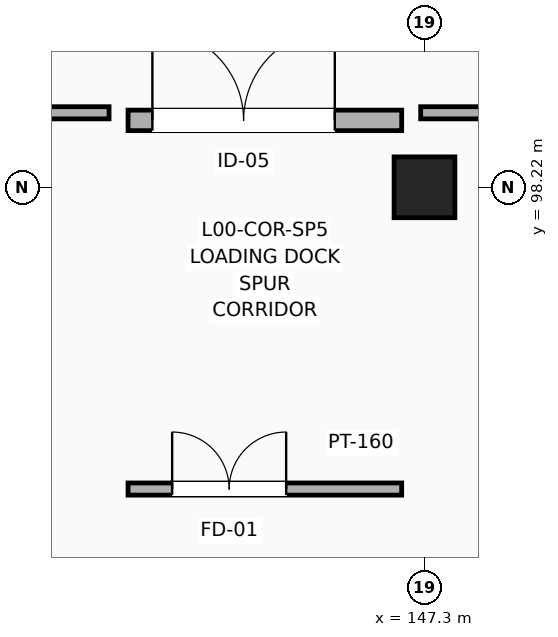
"""IFC4 building model, lengths in metres.
Left out: names, types, materials, properties, quantities, classifications, styles, units other than length and angle.
Written with IfcOpenShell. Run it as: python <this file> out.ifc"""

import sys

from ifc_helpers import new_model, si_unit, direction, frame, frame_2d, origin, origin_2d, place, context, subcontext, project, spatial, rectangle, extrude, element, fill, save


model = new_model("IFC4")
c1 = context("Model", 3, precision=1e-05, world=origin(), true_north=direction((0.0, 1.0)))
c2 = subcontext(c1, "Body", "Model", "MODEL_VIEW")
j1 = project(units=[si_unit("LENGTHUNIT", "METRE"), si_unit("PLANEANGLEUNIT", "RADIAN")], contexts=[c1])
p1 = place(None, origin())
s1 = spatial("IfcSite", under=j1, at=p1, CompositionType="ELEMENT")
p2 = place(p1, origin())
s2 = spatial("IfcBuilding", under=s1, at=p2, CompositionType="ELEMENT")
p3 = place(p2, origin())
s3 = spatial("IfcBuildingStorey", under=s2, at=p3, CompositionType="ELEMENT", Elevation=0.0)
p4 = place(p3, frame((147.3, 98.22, 0.0), z_axis=(0.0, 0.0, 1.0), x_axis=(1.0, 0.0, 0.0)))
e1 = element("IfcColumn", 1, at=p4, inside=s3, PredefinedType="COLUMN", context=c2, shape_type="SweptSolid", body=[
    extrude(rectangle(XDim=0.8, YDim=0.8, at=origin_2d()), origin(), (0.0, 0.0, 1.0), 5.4),
])
p5 = place(p3, frame((143.4, 94.25, 0.0), z_axis=(0.0, 0.0, 1.0), x_axis=(1.0, 0.0, 0.0)))
e2 = element("IfcWall", 2, at=p5, inside=s3, PredefinedType="PARTITIONING", context=c2, shape_type="SweptSolid", body=[
    extrude(rectangle(XDim=3.6, YDim=0.16, at=frame_2d((1.8, 0.0))), origin(), (0.0, 0.0, 1.0), 4.727),
])
p6 = place(p5, frame((0.58, 0.0, 0.0)))
e3 = element("IfcOpeningElement", 3, at=p6, cuts=e2, PredefinedType="OPENING", context=c2, shape_type="SweptSolid", body=[
    extrude(rectangle(XDim=1.5, YDim=2.2, at=frame_2d((0.75, 1.1))), frame((0.0, 0.09, 0.0), z_axis=(0.0, -1.0, 0.0), x_axis=(1.0, 0.0, 0.0)), (0.0, 0.0, 1.0), 0.18),
])
p7 = place(p3, frame((143.4, 99.1, 0.0), z_axis=(0.0, 0.0, 1.0), x_axis=(1.0, 0.0, 0.0)))
e4 = element("IfcWall", 4, at=p7, inside=s3, PredefinedType="SOLIDWALL", context=c2, shape_type="SweptSolid", body=[
    extrude(rectangle(XDim=3.6, YDim=0.27, at=frame_2d((1.8, 0.0))), origin(), (0.0, 0.0, 1.0), 4.687),
])
p8 = place(p7, frame((0.32, 0.0, 0.0)))
e5 = element("IfcOpeningElement", 5, at=p8, cuts=e4, PredefinedType="OPENING", context=c2, shape_type="SweptSolid", body=[
    extrude(rectangle(XDim=2.4, YDim=2.8, at=frame_2d((1.2, 1.4))), frame((0.0, 0.145, 0.0), z_axis=(0.0, -1.0, 0.0), x_axis=(1.0, 0.0, 0.0)), (0.0, 0.0, 1.0), 0.29),
])
p9 = place(p3, frame((131.5, 99.2, 0.0), z_axis=(0.0, 0.0, 1.0), x_axis=(1.0, 0.0, 0.0)))
e6 = element("IfcWall", 6, at=p9, inside=s3, PredefinedType="PARTITIONING", context=c2, shape_type="SweptSolid", body=[
    extrude(rectangle(XDim=11.65, YDim=0.16, at=frame_2d((5.825, 0.0))), origin(), (0.0, 0.0, 1.0), 4.337),
])
p10 = place(p3, frame((147.25, 99.2, 0.0), z_axis=(0.0, 0.0, 1.0), x_axis=(1.0, 0.0, 0.0)))
e7 = element("IfcWall", 7, at=p10, inside=s3, PredefinedType="PARTITIONING", context=c2, shape_type="SweptSolid", body=[
    extrude(rectangle(XDim=15.75, YDim=0.16, at=frame_2d((7.875, 0.0))), origin(), (0.0, 0.0, 1.0), 4.337),
])
p11 = place(p6, origin())
e8 = element("IfcDoor", 8, at=p11, inside=s3, OperationType="DOUBLE_DOOR_SINGLE_SWING", PredefinedType="DOOR", context=c2, shape_type="SweptSolid", body=[
    extrude(rectangle(XDim=1.5, YDim=2.2, at=frame_2d((0.75, 1.1))), frame((0.0, 0.025, 0.0), z_axis=(0.0, -1.0, 0.0), x_axis=(1.0, 0.0, 0.0)), (0.0, 0.0, 1.0), 0.05),
])
fill(e3, e8)
p12 = place(p8, origin())
e9 = element("IfcDoor", 9, at=p12, inside=s3, OperationType="DOUBLE_DOOR_SINGLE_SWING", PredefinedType="DOOR", context=c2, shape_type="SweptSolid", body=[
    extrude(rectangle(XDim=2.4, YDim=2.8, at=frame_2d((1.2, 1.4))), frame((0.0, 0.025, 0.0), z_axis=(0.0, -1.0, 0.0), x_axis=(1.0, 0.0, 0.0)), (0.0, 0.0, 1.0), 0.05),
])
fill(e5, e9)
save(model, sys.argv[1])
